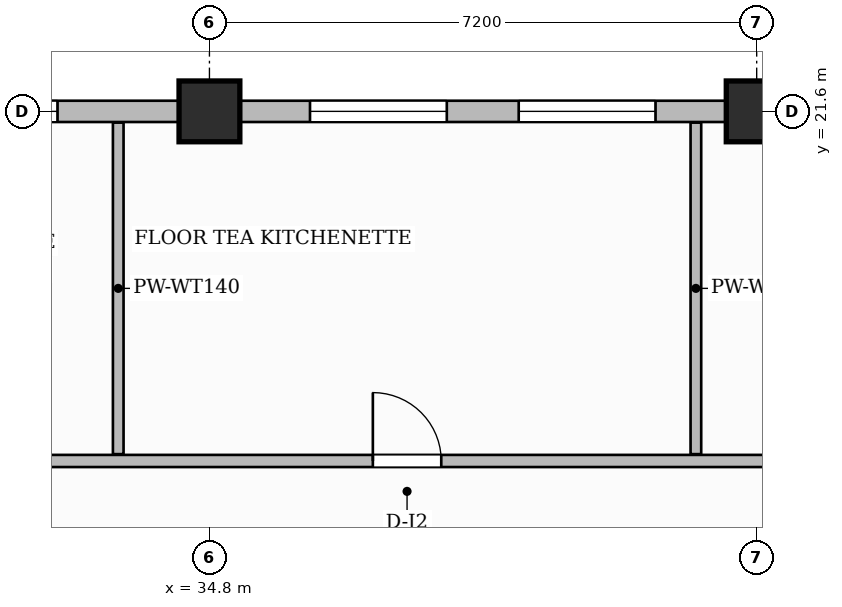
"""IFC4 building model, lengths in metres.
Left out: names, types, materials, properties, quantities, classifications, styles, units other than length and angle.
Written with IfcOpenShell. Run it as: python <this file> out.ifc"""

import sys

from ifc_helpers import new_model, si_unit, direction, frame, frame_2d, origin, origin_2d, place, context, subcontext, project, spatial, rectangle, extrude, source, transform, mapped, element, fill, save


model = new_model("IFC4")
c1 = context("Model", 3, precision=1e-05, world=origin(), true_north=direction((0.0, 1.0)))
c2 = subcontext(c1, "Body", "Model", "MODEL_VIEW")
j1 = project(units=[si_unit("LENGTHUNIT", "METRE"), si_unit("PLANEANGLEUNIT", "RADIAN")], contexts=[c1])
p1 = place(None, origin())
s1 = spatial("IfcSite", under=j1, at=p1, CompositionType="ELEMENT")
p2 = place(p1, origin())
s2 = spatial("IfcBuilding", under=s1, at=p2, CompositionType="ELEMENT")
p3 = place(p2, frame((0.0, 0.0, 251.95)))
s3 = spatial("IfcBuildingStorey", under=s2, at=p3, CompositionType="ELEMENT", Elevation=251.95)
m1 = source(origin(), c2, "Body", "SweptSolid", [
    extrude(rectangle(XDim=0.8, YDim=0.8, at=origin_2d()), origin(), (0.0, 0.0, 1.0), 3.85),
])
for number, where, z_axis, x_axis in (
    (1, (34.8, 21.6, 0.0), (0.0, 0.0, 1.0), (1.0, 0.0, 0.0)),
    (2, (42.0, 21.6, 0.0), (0.0, 0.0, 1.0), (1.0, 0.0, 0.0)),
):
    element("IfcColumn", number, at=place(p3, frame(where, z_axis=z_axis, x_axis=x_axis)), inside=s3, PredefinedType="COLUMN", context=c2, shape_type="MappedRepresentation", body=[
        mapped(m1, transform((0.0, 0.0, 0.0), scale=1.0)),
    ])
p4 = place(p3, frame((30.29, 17.0, 0.0), z_axis=(0.0, 0.0, 1.0), x_axis=(1.0, 0.0, 0.0)))
e3 = element("IfcWall", 3, at=p4, inside=s3, PredefinedType="PARTITIONING", context=c2, shape_type="SweptSolid", body=[
    extrude(rectangle(XDim=19.37, YDim=0.16, at=frame_2d((9.685, 0.0))), origin(), (0.0, 0.0, 1.0), 3.6),
])
p5 = place(p4, frame((1.185, 0.0, 0.0)))
e4 = element("IfcOpeningElement", 4, at=p5, cuts=e3, PredefinedType="OPENING", context=c2, shape_type="SweptSolid", body=[
    extrude(rectangle(XDim=0.85, YDim=2.1, at=frame_2d((0.425, 1.05))), frame((0.0, 0.09, 0.0), z_axis=(0.0, -1.0, 0.0), x_axis=(1.0, 0.0, 0.0)), (0.0, 0.0, 1.0), 0.18),
])
p6 = place(p4, frame((6.66, 0.0, 0.0)))
e5 = element("IfcOpeningElement", 5, at=p6, cuts=e3, PredefinedType="OPENING", context=c2, shape_type="SweptSolid", body=[
    extrude(rectangle(XDim=0.9, YDim=2.15, at=frame_2d((0.45, 1.075))), frame((0.0, 0.09, 0.0), z_axis=(0.0, -1.0, 0.0), x_axis=(1.0, 0.0, 0.0)), (0.0, 0.0, 1.0), 0.18),
])
p7 = place(p4, frame((14.46, 0.0, 0.0)))
e6 = element("IfcOpeningElement", 6, at=p7, cuts=e3, PredefinedType="OPENING", context=c2, shape_type="SweptSolid", body=[
    extrude(rectangle(XDim=1.4, YDim=2.35, at=frame_2d((0.7, 1.175))), frame((0.0, 0.09, 0.0), z_axis=(0.0, -1.0, 0.0), x_axis=(1.0, 0.0, 0.0)), (0.0, 0.0, 1.0), 0.18),
])
for number, where, z_axis, x_axis in (
    (7, (33.6, 17.09, 0.0), (0.0, 0.0, 1.0), (0.0, 1.0, 0.0)),
    (8, (41.2, 17.09, 0.0), (0.0, 0.0, 1.0), (0.0, 1.0, 0.0)),
):
    element("IfcWall", number, at=place(p3, frame(where, z_axis=z_axis, x_axis=x_axis)), inside=s3, PredefinedType="PARTITIONING", context=c2, shape_type="SweptSolid", body=[
        extrude(rectangle(XDim=4.362, YDim=0.14, at=frame_2d((2.181, 0.0))), origin(), (0.0, 0.0, 1.0), 3.6),
    ])
p8 = place(p3, frame((18.0, 21.6, 0.0), z_axis=(0.0, 0.0, 1.0), x_axis=(1.0, 0.0, 0.0)))
e9 = element("IfcWall", 9, at=p8, inside=s3, PredefinedType="SOLIDWALL", context=c2, shape_type="SweptSolid", body=[
    extrude(rectangle(XDim=31.8, YDim=0.28, at=frame_2d((15.9, 0.0))), origin(), (0.0, 0.0, 1.0), 3.135),
])
p9 = place(p8, frame((0.885, 0.0, 0.8)))
e10 = element("IfcOpeningElement", 10, at=p9, cuts=e9, PredefinedType="OPENING", context=c2, shape_type="SweptSolid", body=[
    extrude(rectangle(XDim=1.4, YDim=1.85, at=frame_2d((0.7, 0.925))), frame((0.0, 0.15, 0.0), z_axis=(0.0, -1.0, 0.0), x_axis=(1.0, 0.0, 0.0)), (0.0, 0.0, 1.0), 0.3),
])
p10 = place(p8, frame((4.721, 0.0, 0.8)))
e11 = element("IfcOpeningElement", 11, at=p10, cuts=e9, PredefinedType="OPENING", context=c2, shape_type="SweptSolid", body=[
    extrude(rectangle(XDim=1.15, YDim=1.8, at=frame_2d((0.575, 0.9))), frame((0.0, 0.15, 0.0), z_axis=(0.0, -1.0, 0.0), x_axis=(1.0, 0.0, 0.0)), (0.0, 0.0, 1.0), 0.3),
])
p11 = place(p8, frame((7.204, 0.0, 0.8)))
e12 = element("IfcOpeningElement", 12, at=p11, cuts=e9, PredefinedType="OPENING", context=c2, shape_type="SweptSolid", body=[
    extrude(rectangle(XDim=1.8, YDim=1.85, at=frame_2d((0.9, 0.925))), frame((0.0, 0.15, 0.0), z_axis=(0.0, -1.0, 0.0), x_axis=(1.0, 0.0, 0.0)), (0.0, 0.0, 1.0), 0.3),
])
p12 = place(p8, frame((13.001, 0.0, 0.8)))
e13 = element("IfcOpeningElement", 13, at=p12, cuts=e9, PredefinedType="OPENING", context=c2, shape_type="SweptSolid", body=[
    extrude(rectangle(XDim=1.8, YDim=1.85, at=frame_2d((0.9, 0.925))), frame((0.0, 0.15, 0.0), z_axis=(0.0, -1.0, 0.0), x_axis=(1.0, 0.0, 0.0)), (0.0, 0.0, 1.0), 0.3),
])
p13 = place(p8, frame((18.123, 0.0, 0.8)))
e14 = element("IfcOpeningElement", 14, at=p13, cuts=e9, PredefinedType="OPENING", context=c2, shape_type="SweptSolid", body=[
    extrude(rectangle(XDim=1.8, YDim=1.85, at=frame_2d((0.9, 0.925))), frame((0.0, 0.15, 0.0), z_axis=(0.0, -1.0, 0.0), x_axis=(1.0, 0.0, 0.0)), (0.0, 0.0, 1.0), 0.3),
])
p14 = place(p8, frame((20.869, 0.0, 0.8)))
e15 = element("IfcOpeningElement", 15, at=p14, cuts=e9, PredefinedType="OPENING", context=c2, shape_type="SweptSolid", body=[
    extrude(rectangle(XDim=1.8, YDim=1.85, at=frame_2d((0.9, 0.925))), frame((0.0, 0.15, 0.0), z_axis=(0.0, -1.0, 0.0), x_axis=(1.0, 0.0, 0.0)), (0.0, 0.0, 1.0), 0.3),
])
p15 = place(p8, frame((25.475, 0.0, 0.8)))
e16 = element("IfcOpeningElement", 16, at=p15, cuts=e9, PredefinedType="OPENING", context=c2, shape_type="SweptSolid", body=[
    extrude(rectangle(XDim=1.8, YDim=1.85, at=frame_2d((0.9, 0.925))), frame((0.0, 0.15, 0.0), z_axis=(0.0, -1.0, 0.0), x_axis=(1.0, 0.0, 0.0)), (0.0, 0.0, 1.0), 0.3),
])
p16 = place(p8, frame((28.525, 0.0, 0.8)))
e17 = element("IfcOpeningElement", 17, at=p16, cuts=e9, PredefinedType="OPENING", context=c2, shape_type="SweptSolid", body=[
    extrude(rectangle(XDim=1.8, YDim=1.85, at=frame_2d((0.9, 0.925))), frame((0.0, 0.15, 0.0), z_axis=(0.0, -1.0, 0.0), x_axis=(1.0, 0.0, 0.0)), (0.0, 0.0, 1.0), 0.3),
])
m2 = source(origin(), c2, "Body", "SweptSolid", [
    extrude(rectangle(XDim=0.9, YDim=2.15, at=frame_2d((0.45, 1.075))), frame((0.0, 0.025, 0.0), z_axis=(0.0, -1.0, 0.0), x_axis=(1.0, 0.0, 0.0)), (0.0, 0.0, 1.0), 0.05),
])
p17 = place(p6, origin())
e18 = element("IfcDoor", 18, at=p17, inside=s3, OperationType="SINGLE_SWING_LEFT", PredefinedType="DOOR", context=c2, shape_type="MappedRepresentation", body=[
    mapped(m2, transform((0.0, 0.0, 0.0), scale=1.0)),
])
fill(e5, e18)
m3 = source(origin(), c2, "Body", "SweptSolid", [
    extrude(rectangle(XDim=1.8, YDim=1.85, at=frame_2d((0.9, 0.925))), frame((0.0, 0.03, 0.0), z_axis=(0.0, -1.0, 0.0), x_axis=(1.0, 0.0, 0.0)), (0.0, 0.0, 1.0), 0.06),
])
p18 = place(p12, origin())
e19 = element("IfcWindow", 19, at=p18, inside=s3, PartitioningType="DOUBLE_PANEL_VERTICAL", PredefinedType="WINDOW", context=c2, shape_type="MappedRepresentation", body=[
    mapped(m3, transform((0.0, 0.0, 0.0), scale=1.0)),
])
fill(e13, e19)
p19 = place(p13, origin())
e20 = element("IfcWindow", 20, at=p19, inside=s3, PartitioningType="DOUBLE_PANEL_VERTICAL", PredefinedType="WINDOW", context=c2, shape_type="MappedRepresentation", body=[
    mapped(m3, transform((0.0, 0.0, 0.0), scale=1.0)),
])
fill(e14, e20)
p20 = place(p14, origin())
e21 = element("IfcWindow", 21, at=p20, inside=s3, PartitioningType="DOUBLE_PANEL_VERTICAL", PredefinedType="WINDOW", context=c2, shape_type="MappedRepresentation", body=[
    mapped(m3, transform((0.0, 0.0, 0.0), scale=1.0)),
])
fill(e15, e21)
save(model, sys.argv[1])
